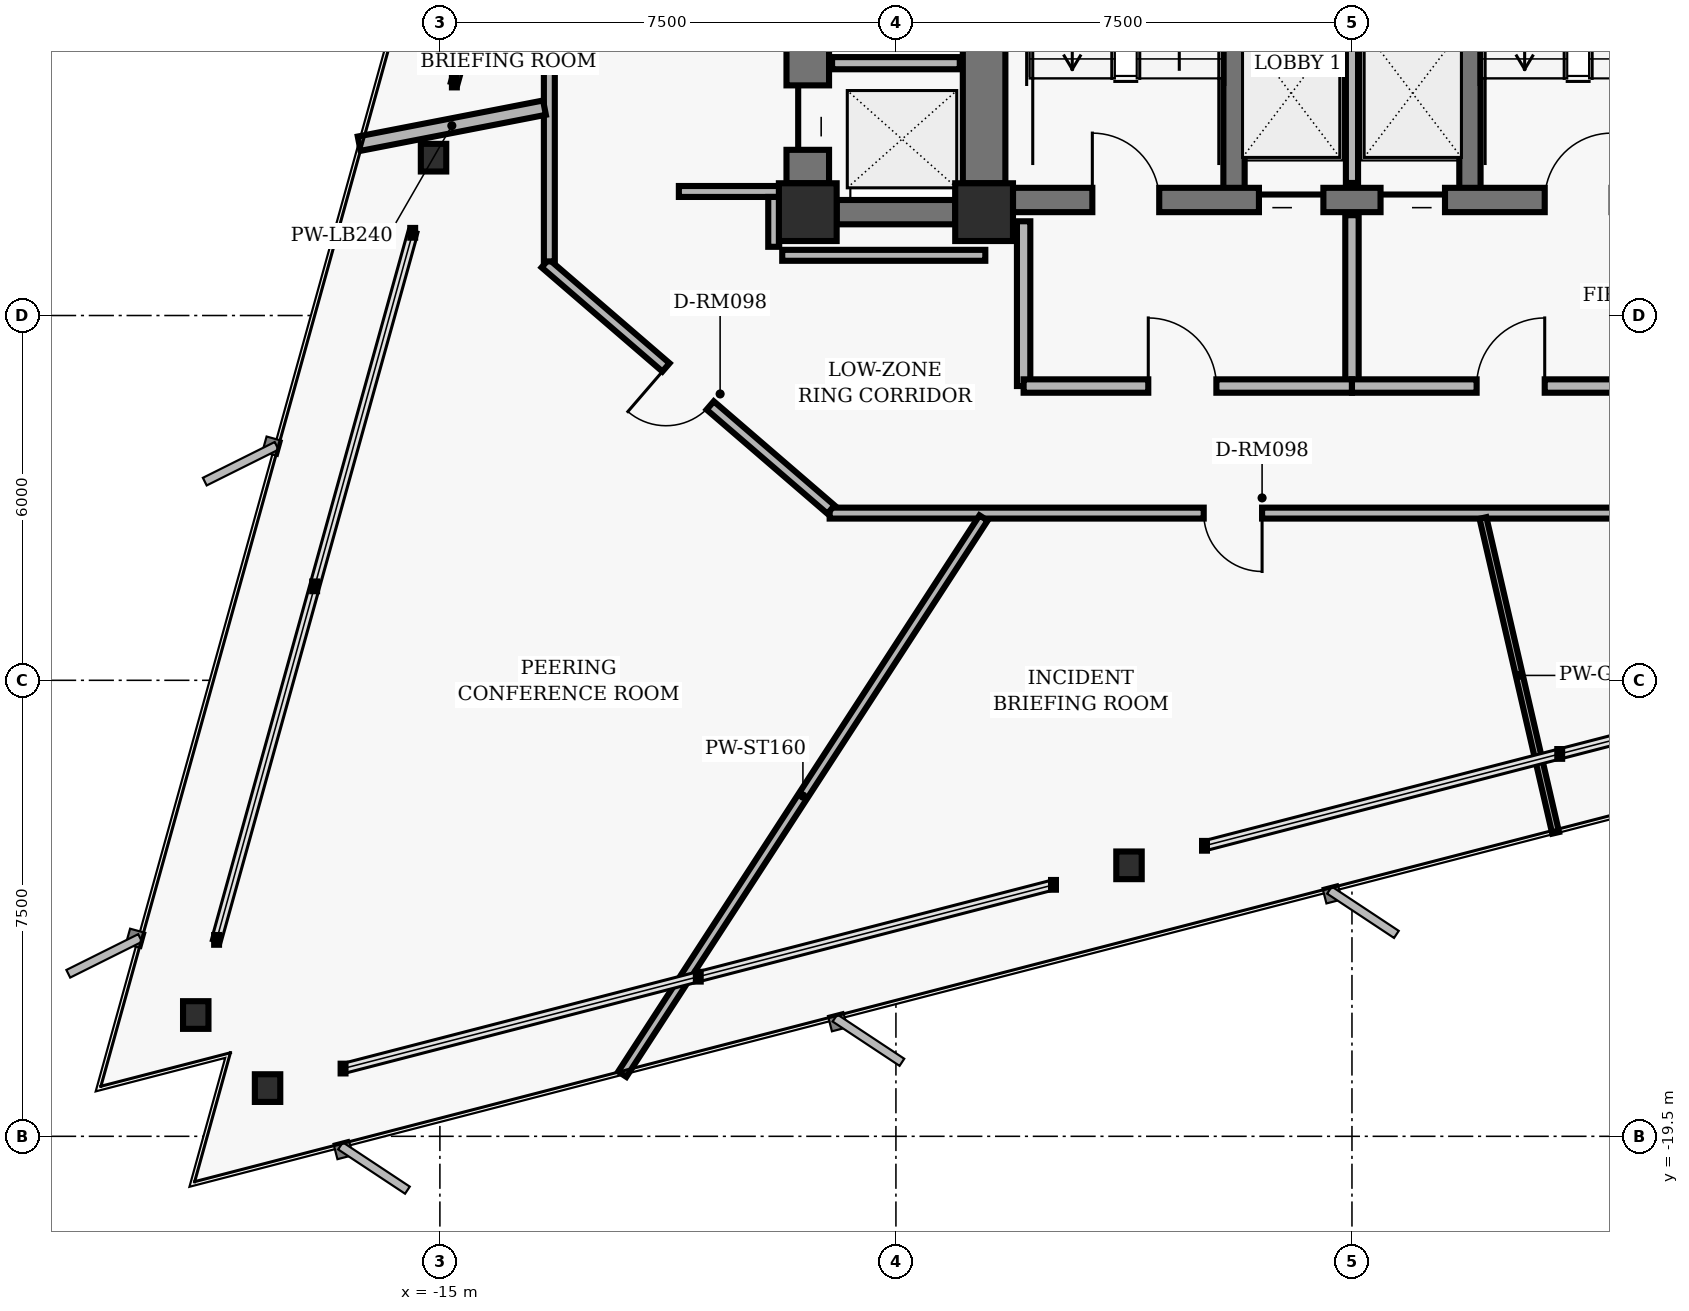
"""IFC4 building model, lengths in metres.
Left out: names, types, materials, properties, quantities, classifications, styles, units other than length and angle.
Written with IfcOpenShell. Run it as: python <this file> out.ifc"""

import sys

from ifc_helpers import new_model, si_unit, direction, frame, frame_2d, origin, origin_2d, place, context, subcontext, project, spatial, rectangle, hollow_rectangle, i_section, extrude, element, fill, save


model = new_model("IFC4")
c1 = context("Model", 3, precision=1e-05, world=origin(), true_north=direction((0.0, 1.0)))
c2 = subcontext(c1, "Body", "Model", "MODEL_VIEW")
j1 = project(units=[si_unit("LENGTHUNIT", "METRE"), si_unit("PLANEANGLEUNIT", "RADIAN")], contexts=[c1])
p1 = place(None, origin())
s1 = spatial("IfcSite", under=j1, at=p1, CompositionType="ELEMENT")
p2 = place(p1, origin())
s2 = spatial("IfcBuilding", under=s1, at=p2, CompositionType="ELEMENT")
p3 = place(p2, frame((0.0, 0.0, 79.52)))
s3 = spatial("IfcBuildingStorey", under=s2, at=p3, CompositionType="ELEMENT", Elevation=79.52)
for number, where, z_axis, x_axis in (
    (1, (-6.05, -4.3, 0.0), (0.0, 0.0, 1.0), (1.0, 0.0, 0.0)),
    (2, (-8.95, -4.3, 0.0), (0.0, 0.0, 1.0), (1.0, 0.0, 0.0)),
):
    element("IfcColumn", number, at=place(p3, frame(where, z_axis=z_axis, x_axis=x_axis)), inside=s3, PredefinedType="COLUMN", context=c2, shape_type="SweptSolid", body=[
        extrude(hollow_rectangle(XDim=0.95, YDim=0.95, WallThickness=0.06, InnerFilletRadius=0.02, OuterFilletRadius=0.04, at=origin_2d()), origin(), (0.0, 0.0, 1.0), 3.04),
    ])
p4 = place(p3, frame((-6.05, -3.825, 0.0), z_axis=(0.0, 0.0, 1.0), x_axis=(0.0, 1.0, 0.0)))
e3 = element("IfcWall", 3, at=p4, inside=s3, PredefinedType="SHEAR", context=c2, shape_type="SweptSolid", body=[
    extrude(rectangle(XDim=3.35, YDim=0.7, at=frame_2d((1.675, 0.0))), origin(), (0.0, 0.0, 1.0), 2.788),
])
for number, where, z_axis, x_axis in (
    (4, (-1.94, -4.1, 0.0), (0.0, 0.0, 1.0), (0.0, 1.0, 0.0)),
    (5, (1.94, -4.1, 0.0), (0.0, 0.0, 1.0), (0.0, 1.0, 0.0)),
):
    element("IfcWall", number, at=place(p3, frame(where, z_axis=z_axis, x_axis=x_axis)), inside=s3, PredefinedType="SHEAR", context=c2, shape_type="SweptSolid", body=[
        extrude(rectangle(XDim=8.2, YDim=0.35, at=frame_2d((4.1, 0.0))), origin(), (0.0, 0.0, 1.0), 2.788),
    ])
p5 = place(p3, frame((-5.575, -4.1, 0.0), z_axis=(0.0, 0.0, 1.0), x_axis=(1.0, 0.0, 0.0)))
e6 = element("IfcWall", 6, at=p5, inside=s3, PredefinedType="SHEAR", context=c2, shape_type="SweptSolid", body=[
    extrude(rectangle(XDim=11.15, YDim=0.4, at=frame_2d((5.575, 0.0))), origin(), (0.0, 0.0, 1.0), 2.788),
])
p6 = place(p5, frame((1.305, 0.0, 0.0)))
e7 = element("IfcOpeningElement", 7, at=p6, cuts=e6, PredefinedType="OPENING", context=c2, shape_type="SweptSolid", body=[
    extrude(rectangle(XDim=1.1, YDim=2.04, at=frame_2d((0.55, 1.02))), frame((0.0, 0.21, 0.0), z_axis=(0.0, -1.0, 0.0), x_axis=(1.0, 0.0, 0.0)), (0.0, 0.0, 1.0), 0.42),
])
p7 = place(p5, frame((8.745, 0.0, 0.0)))
e8 = element("IfcOpeningElement", 8, at=p7, cuts=e6, PredefinedType="OPENING", context=c2, shape_type="SweptSolid", body=[
    extrude(rectangle(XDim=1.1, YDim=2.04, at=frame_2d((0.55, 1.02))), frame((0.0, 0.21, 0.0), z_axis=(0.0, -1.0, 0.0), x_axis=(1.0, 0.0, 0.0)), (0.0, 0.0, 1.0), 0.42),
])
p8 = place(p5, frame((4.045, 0.0, 0.0)))
e9 = element("IfcOpeningElement", 9, at=p8, cuts=e6, PredefinedType="OPENING", context=c2, shape_type="SweptSolid", body=[
    extrude(rectangle(XDim=1.06, YDim=2.04, at=frame_2d((0.53, 1.02))), frame((0.0, 0.21, 0.0), z_axis=(0.0, -1.0, 0.0), x_axis=(1.0, 0.0, 0.0)), (0.0, 0.0, 1.0), 0.42),
])
p9 = place(p5, frame((6.045, 0.0, 0.0)))
e10 = element("IfcOpeningElement", 10, at=p9, cuts=e6, PredefinedType="OPENING", context=c2, shape_type="SweptSolid", body=[
    extrude(rectangle(XDim=1.06, YDim=2.04, at=frame_2d((0.53, 1.02))), frame((0.0, 0.21, 0.0), z_axis=(0.0, -1.0, 0.0), x_axis=(1.0, 0.0, 0.0)), (0.0, 0.0, 1.0), 0.42),
])
p10 = place(p3, frame((-8.95, -3.825, 0.0), z_axis=(0.0, 0.0, 1.0), x_axis=(0.0, 1.0, 0.0)))
e11 = element("IfcWall", 11, at=p10, inside=s3, PredefinedType="SHEAR", context=c2, shape_type="SweptSolid", body=[
    extrude(rectangle(XDim=7.85, YDim=0.7, at=frame_2d((3.925, 0.0))), origin(), (0.0, 0.0, 1.0), 2.788),
])
p11 = place(p10, frame((0.55, 0.0, 0.0)))
e12 = element("IfcOpeningElement", 12, at=p11, cuts=e11, PredefinedType="OPENING", context=c2, shape_type="SweptSolid", body=[
    extrude(rectangle(XDim=1.06, YDim=2.04, at=frame_2d((0.53, 1.02))), frame((0.0, 0.36, 0.0), z_axis=(0.0, -1.0, 0.0), x_axis=(1.0, 0.0, 0.0)), (0.0, 0.0, 1.0), 0.72),
])
p12 = place(p10, frame((3.395, 0.0, 0.0)))
e13 = element("IfcOpeningElement", 13, at=p12, cuts=e11, PredefinedType="OPENING", context=c2, shape_type="SweptSolid", body=[
    extrude(rectangle(XDim=1.06, YDim=2.04, at=frame_2d((0.53, 1.02))), frame((0.0, 0.36, 0.0), z_axis=(0.0, -1.0, 0.0), x_axis=(1.0, 0.0, 0.0)), (0.0, 0.0, 1.0), 0.72),
])
p13 = place(p10, frame((6.23, 0.0, 0.0)))
e14 = element("IfcOpeningElement", 14, at=p13, cuts=e11, PredefinedType="OPENING", context=c2, shape_type="SweptSolid", body=[
    extrude(rectangle(XDim=1.06, YDim=2.04, at=frame_2d((0.53, 1.02))), frame((0.0, 0.36, 0.0), z_axis=(0.0, -1.0, 0.0), x_axis=(1.0, 0.0, 0.0)), (0.0, 0.0, 1.0), 0.72),
])
p14 = place(p3, frame((-8.475, -4.3, 0.0), z_axis=(0.0, 0.0, 1.0), x_axis=(1.0, 0.0, 0.0)))
e15 = element("IfcWall", 15, at=p14, inside=s3, PredefinedType="SHEAR", context=c2, shape_type="SweptSolid", body=[
    extrude(rectangle(XDim=1.95, YDim=0.4, at=frame_2d((0.975, 0.0))), origin(), (0.0, 0.0, 1.0), 2.788),
])
for number, where, z_axis, x_axis in (
    (16, (-15.104, -3.404, 0.0), (0.0, 0.0, 1.0), (1.0, 0.0, 0.0)),
    (17, (-19.015, -17.505, 0.0), (0.0, 0.0, 1.0), (1.0, 0.0, 0.0)),
    (18, (-17.834, -18.707, 0.0), (0.0, 0.0, 1.0), (1.0, 0.0, 0.0)),
    (19, (-3.667, -15.043, 0.0), (0.0, 0.0, 1.0), (1.0, 0.0, 0.0)),
):
    element("IfcColumn", number, at=place(p3, frame(where, z_axis=z_axis, x_axis=x_axis)), inside=s3, PredefinedType="COLUMN", context=c2, shape_type="SweptSolid", body=[
        extrude(i_section(OverallWidth=0.418, OverallDepth=0.455, WebThickness=0.042, FlangeThickness=0.068, FilletRadius=0.025, at=origin_2d()), origin(), (0.0, 0.0, 1.0), 3.04),
    ])
p15 = place(p3, frame((0.0, -3.82, 0.0), z_axis=(0.0, 0.0, 1.0), x_axis=(0.0, 1.0, 0.0)))
e20 = element("IfcWall", 20, at=p15, inside=s3, PredefinedType="PARTITIONING", context=c2, shape_type="SweptSolid", body=[
    extrude(rectangle(XDim=2.67, YDim=0.2, at=frame_2d((1.335, 0.0))), origin(), (0.0, 0.0, 1.0), 2.763),
])
p16 = place(p3, frame((-5.4, -7.16, 0.0), z_axis=(0.0, 0.0, 1.0), x_axis=(0.0, 1.0, 0.0)))
e21 = element("IfcWall", 21, at=p16, inside=s3, PredefinedType="PARTITIONING", context=c2, shape_type="SweptSolid", body=[
    extrude(rectangle(XDim=2.71, YDim=0.22, at=frame_2d((1.355, 0.0))), origin(), (0.0, 0.0, 1.0), 2.763),
])
p17 = place(p3, frame((0.0, -7.16, 0.0), z_axis=(0.0, 0.0, 1.0), x_axis=(0.0, 1.0, 0.0)))
e22 = element("IfcWall", 22, at=p17, inside=s3, PredefinedType="PARTITIONING", context=c2, shape_type="SweptSolid", body=[
    extrude(rectangle(XDim=2.81, YDim=0.22, at=frame_2d((1.405, 0.0))), origin(), (0.0, 0.0, 1.0), 2.763),
])
p18 = place(p3, frame((-5.4, -7.16, 0.0), z_axis=(0.0, 0.0, 1.0), x_axis=(1.0, 0.0, 0.0)))
e23 = element("IfcWall", 23, at=p18, inside=s3, PredefinedType="PARTITIONING", context=c2, shape_type="SweptSolid", body=[
    extrude(rectangle(XDim=5.4, YDim=0.22, at=frame_2d((2.7, 0.0))), origin(), (0.0, 0.0, 1.0), 2.763),
])
p19 = place(p18, frame((2.05, 0.0, 0.0)))
e24 = element("IfcOpeningElement", 24, at=p19, cuts=e23, PredefinedType="OPENING", context=c2, shape_type="SweptSolid", body=[
    extrude(rectangle(XDim=1.12, YDim=2.02, at=frame_2d((0.56, 1.01))), frame((0.0, 0.12, 0.0), z_axis=(0.0, -1.0, 0.0), x_axis=(1.0, 0.0, 0.0)), (0.0, 0.0, 1.0), 0.24),
])
p20 = place(p3, frame((0.0, -7.16, 0.0), z_axis=(0.0, 0.0, 1.0), x_axis=(1.0, 0.0, 0.0)))
e25 = element("IfcWall", 25, at=p20, inside=s3, PredefinedType="PARTITIONING", context=c2, shape_type="SweptSolid", body=[
    extrude(rectangle(XDim=5.4, YDim=0.22, at=frame_2d((2.7, 0.0))), origin(), (0.0, 0.0, 1.0), 2.763),
])
p21 = place(p20, frame((2.05, 0.0, 0.0)))
e26 = element("IfcOpeningElement", 26, at=p21, cuts=e25, PredefinedType="OPENING", context=c2, shape_type="SweptSolid", body=[
    extrude(rectangle(XDim=1.12, YDim=2.02, at=frame_2d((0.56, 1.01))), frame((0.0, 0.12, 0.0), z_axis=(0.0, -1.0, 0.0), x_axis=(1.0, 0.0, 0.0)), (0.0, 0.0, 1.0), 0.24),
])
p22 = place(p3, frame((-8.55, -1.85, 0.0), z_axis=(0.0, 0.0, 1.0), x_axis=(1.0, 0.0, 0.0)))
e27 = element("IfcWall", 27, at=p22, inside=s3, PredefinedType="PARTITIONING", context=c2, shape_type="SweptSolid", body=[
    extrude(rectangle(XDim=2.1, YDim=0.2, at=frame_2d((1.05, 0.0))), origin(), (0.0, 0.0, 1.0), 2.763),
])
p23 = place(p3, frame((8.41, -9.25, 0.0), z_axis=(0.0, 0.0, 1.0), x_axis=(-1.0, 0.0, 0.0)))
e28 = element("IfcWall", 28, at=p23, inside=s3, PredefinedType="PARTITIONING", context=c2, shape_type="SweptSolid", body=[
    extrude(rectangle(XDim=17.0, YDim=0.18, at=frame_2d((8.5, 0.0))), origin(), (0.0, 0.0, 1.0), 2.277),
])
p24 = place(p23, frame((9.888, 0.0, 0.0)))
e29 = element("IfcOpeningElement", 29, at=p24, cuts=e28, PredefinedType="OPENING", context=c2, shape_type="SweptSolid", body=[
    extrude(rectangle(XDim=0.96, YDim=2.02, at=frame_2d((0.48, 1.01))), frame((0.0, 0.1, 0.0), z_axis=(0.0, -1.0, 0.0), x_axis=(1.0, 0.0, 0.0)), (0.0, 0.0, 1.0), 0.2),
])
p25 = place(p23, frame((2.777, 0.0, 0.0)))
e30 = element("IfcOpeningElement", 30, at=p25, cuts=e28, PredefinedType="OPENING", context=c2, shape_type="SweptSolid", body=[
    extrude(rectangle(XDim=0.96, YDim=2.02, at=frame_2d((0.48, 1.01))), frame((0.0, 0.1, 0.0), z_axis=(0.0, -1.0, 0.0), x_axis=(1.0, 0.0, 0.0)), (0.0, 0.0, 1.0), 0.2),
])
p26 = place(p3, frame((-8.568, -9.191, 0.0), z_axis=(0.0, 0.0, 1.0), x_axis=(-0.757556899173, 0.652769135694, 0.0)))
e31 = element("IfcWall", 31, at=p26, inside=s3, PredefinedType="PARTITIONING", context=c2, shape_type="SweptSolid", body=[
    extrude(rectangle(XDim=6.204, YDim=0.18, at=frame_2d((3.102, 0.0))), origin(), (0.0, 0.0, 1.0), 2.763),
])
p27 = place(p26, frame((2.622, 0.0, 0.0)))
e32 = element("IfcOpeningElement", 32, at=p27, cuts=e31, PredefinedType="OPENING", context=c2, shape_type="SweptSolid", body=[
    extrude(rectangle(XDim=0.96, YDim=2.02, at=frame_2d((0.48, 1.01))), frame((0.0, 0.1, 0.0), z_axis=(0.0, -1.0, 0.0), x_axis=(1.0, 0.0, 0.0)), (0.0, 0.0, 1.0), 0.2),
])
p28 = place(p3, frame((-13.2, -5.11, 0.0), z_axis=(0.0, 0.0, 1.0), x_axis=(0.0, 1.0, 0.0)))
e33 = element("IfcWall", 33, at=p28, inside=s3, PredefinedType="PARTITIONING", context=c2, shape_type="SweptSolid", body=[
    extrude(rectangle(XDim=10.22, YDim=0.18, at=frame_2d((5.11, 0.0))), origin(), (0.0, 0.0, 1.0), 2.143),
])
p29 = place(p28, frame((5.765, 0.0, 0.0)))
e34 = element("IfcOpeningElement", 34, at=p29, cuts=e33, PredefinedType="OPENING", context=c2, shape_type="SweptSolid", body=[
    extrude(rectangle(XDim=0.96, YDim=2.02, at=frame_2d((0.48, 1.01))), frame((0.0, 0.1, 0.0), z_axis=(0.0, -1.0, 0.0), x_axis=(1.0, 0.0, 0.0)), (0.0, 0.0, 1.0), 0.2),
])
p30 = place(p3, frame((-11.07, -3.96, 0.0), z_axis=(0.0, 0.0, 1.0), x_axis=(1.0, 0.0, 0.0)))
e35 = element("IfcWall", 35, at=p30, inside=s3, PredefinedType="PARTITIONING", context=c2, shape_type="SweptSolid", body=[
    extrude(rectangle(XDim=1.65, YDim=0.18, at=frame_2d((0.825, 0.0))), origin(), (0.0, 0.0, 1.0), 2.048),
])
p31 = place(p3, frame((-9.51, -4.05, 0.0), z_axis=(0.0, 0.0, 1.0), x_axis=(0.0, -1.0, 0.0)))
e36 = element("IfcWall", 36, at=p31, inside=s3, PredefinedType="PARTITIONING", context=c2, shape_type="SweptSolid", body=[
    extrude(rectangle(XDim=0.82, YDim=0.18, at=frame_2d((0.41, 0.0))), origin(), (0.0, 0.0, 1.0), 2.763),
])
p32 = place(p3, frame((-9.37, -5.01, 0.0), z_axis=(0.0, 0.0, 1.0), x_axis=(1.0, 0.0, 0.0)))
e37 = element("IfcWall", 37, at=p32, inside=s3, PredefinedType="PARTITIONING", context=c2, shape_type="SweptSolid", body=[
    extrude(rectangle(XDim=3.34, YDim=0.18, at=frame_2d((1.67, 0.0))), origin(), (0.0, 0.0, 1.0), 2.763),
])
p33 = place(p3, frame((-13.28, -2.581, 0.0), z_axis=(0.0, 0.0, 1.0), x_axis=(-0.98161907283, -0.190850716155, 0.0)))
e38 = element("IfcWall", 38, at=p33, inside=s3, PredefinedType="PARTITIONING", context=c2, shape_type="SweptSolid", body=[
    extrude(rectangle(XDim=3.105, YDim=0.24, at=frame_2d((1.552, 0.0))), origin(), (0.0, 0.0, 1.0), 2.763),
])
p34 = place(p3, frame((-6.059, -9.33, 0.0), z_axis=(0.0, 0.0, 1.0), x_axis=(-0.544635087887, -0.838673131227, 0.0)))
e39 = element("IfcWall", 39, at=p34, inside=s3, PredefinedType="PARTITIONING", context=c2, shape_type="SweptSolid", body=[
    extrude(rectangle(XDim=10.908, YDim=0.16, at=frame_2d((5.454, 0.0))), origin(), (0.0, 0.0, 1.0), 2.763),
])
p35 = place(p3, frame((2.154, -9.33, 0.0), z_axis=(0.0, 0.0, 1.0), x_axis=(0.22493330832, -0.974374161607, 0.0)))
e40 = element("IfcWall", 40, at=p35, inside=s3, PredefinedType="MOVABLE", context=c2, shape_type="SweptSolid", body=[
    extrude(rectangle(XDim=5.315, YDim=0.115, at=frame_2d((2.658, 0.0))), origin(), (0.0, 0.0, 1.0), 2.763),
])
p36 = place(p6, origin())
e41 = element("IfcDoor", 41, at=p36, inside=s3, OperationType="SINGLE_SWING_LEFT", PredefinedType="DOOR", context=c2, shape_type="SweptSolid", body=[
    extrude(rectangle(XDim=1.1, YDim=2.04, at=frame_2d((0.55, 1.02))), frame((0.0, 0.025, 0.0), z_axis=(0.0, -1.0, 0.0), x_axis=(1.0, 0.0, 0.0)), (0.0, 0.0, 1.0), 0.05),
])
fill(e7, e41)
p37 = place(p7, origin())
e42 = element("IfcDoor", 42, at=p37, inside=s3, OperationType="SINGLE_SWING_RIGHT", PredefinedType="DOOR", context=c2, shape_type="SweptSolid", body=[
    extrude(rectangle(XDim=1.1, YDim=2.04, at=frame_2d((0.55, 1.02))), frame((0.0, 0.025, 0.0), z_axis=(0.0, -1.0, 0.0), x_axis=(1.0, 0.0, 0.0)), (0.0, 0.0, 1.0), 0.05),
])
fill(e8, e42)
p38 = place(p8, origin())
e43 = element("IfcDoor", 43, at=p38, inside=s3, OperationType="SLIDING_TO_LEFT", PredefinedType="DOOR", context=c2, shape_type="SweptSolid", body=[
    extrude(rectangle(XDim=1.06, YDim=2.04, at=frame_2d((0.53, 1.02))), frame((0.0, 0.025, 0.0), z_axis=(0.0, -1.0, 0.0), x_axis=(1.0, 0.0, 0.0)), (0.0, 0.0, 1.0), 0.05),
])
fill(e9, e43)
p39 = place(p9, origin())
e44 = element("IfcDoor", 44, at=p39, inside=s3, OperationType="SLIDING_TO_RIGHT", PredefinedType="DOOR", context=c2, shape_type="SweptSolid", body=[
    extrude(rectangle(XDim=1.06, YDim=2.04, at=frame_2d((0.53, 1.02))), frame((0.0, 0.025, 0.0), z_axis=(0.0, -1.0, 0.0), x_axis=(1.0, 0.0, 0.0)), (0.0, 0.0, 1.0), 0.05),
])
fill(e10, e44)
p40 = place(p19, origin())
e45 = element("IfcDoor", 45, at=p40, inside=s3, OperationType="SINGLE_SWING_LEFT", PredefinedType="DOOR", context=c2, shape_type="SweptSolid", body=[
    extrude(rectangle(XDim=1.12, YDim=2.02, at=frame_2d((0.56, 1.01))), frame((0.0, 0.025, 0.0), z_axis=(0.0, -1.0, 0.0), x_axis=(1.0, 0.0, 0.0)), (0.0, 0.0, 1.0), 0.05),
])
fill(e24, e45)
p41 = place(p21, origin())
e46 = element("IfcDoor", 46, at=p41, inside=s3, OperationType="SINGLE_SWING_RIGHT", PredefinedType="DOOR", context=c2, shape_type="SweptSolid", body=[
    extrude(rectangle(XDim=1.12, YDim=2.02, at=frame_2d((0.56, 1.01))), frame((0.0, 0.025, 0.0), z_axis=(0.0, -1.0, 0.0), x_axis=(1.0, 0.0, 0.0)), (0.0, 0.0, 1.0), 0.05),
])
fill(e26, e46)
p42 = place(p11, origin())
e47 = element("IfcDoor", 47, at=p42, inside=s3, OperationType="SLIDING_TO_LEFT", PredefinedType="DOOR", context=c2, shape_type="SweptSolid", body=[
    extrude(rectangle(XDim=1.06, YDim=2.04, at=frame_2d((0.53, 1.02))), frame((0.0, 0.025, 0.0), z_axis=(0.0, -1.0, 0.0), x_axis=(1.0, 0.0, 0.0)), (0.0, 0.0, 1.0), 0.05),
])
fill(e12, e47)
p43 = place(p27, origin())
e48 = element("IfcDoor", 48, at=p43, inside=s3, OperationType="SINGLE_SWING_RIGHT", PredefinedType="DOOR", context=c2, shape_type="SweptSolid", body=[
    extrude(rectangle(XDim=0.96, YDim=2.02, at=frame_2d((0.48, 1.01))), frame((0.0, 0.025, 0.0), z_axis=(0.0, -1.0, 0.0), x_axis=(1.0, 0.0, 0.0)), (0.0, 0.0, 1.0), 0.05),
])
fill(e32, e48)
p44 = place(p24, origin())
e49 = element("IfcDoor", 49, at=p44, inside=s3, OperationType="SINGLE_SWING_LEFT", PredefinedType="DOOR", context=c2, shape_type="SweptSolid", body=[
    extrude(rectangle(XDim=0.96, YDim=2.02, at=frame_2d((0.48, 1.01))), frame((0.0, 0.025, 0.0), z_axis=(0.0, -1.0, 0.0), x_axis=(1.0, 0.0, 0.0)), (0.0, 0.0, 1.0), 0.05),
])
fill(e29, e49)
save(model, sys.argv[1])
